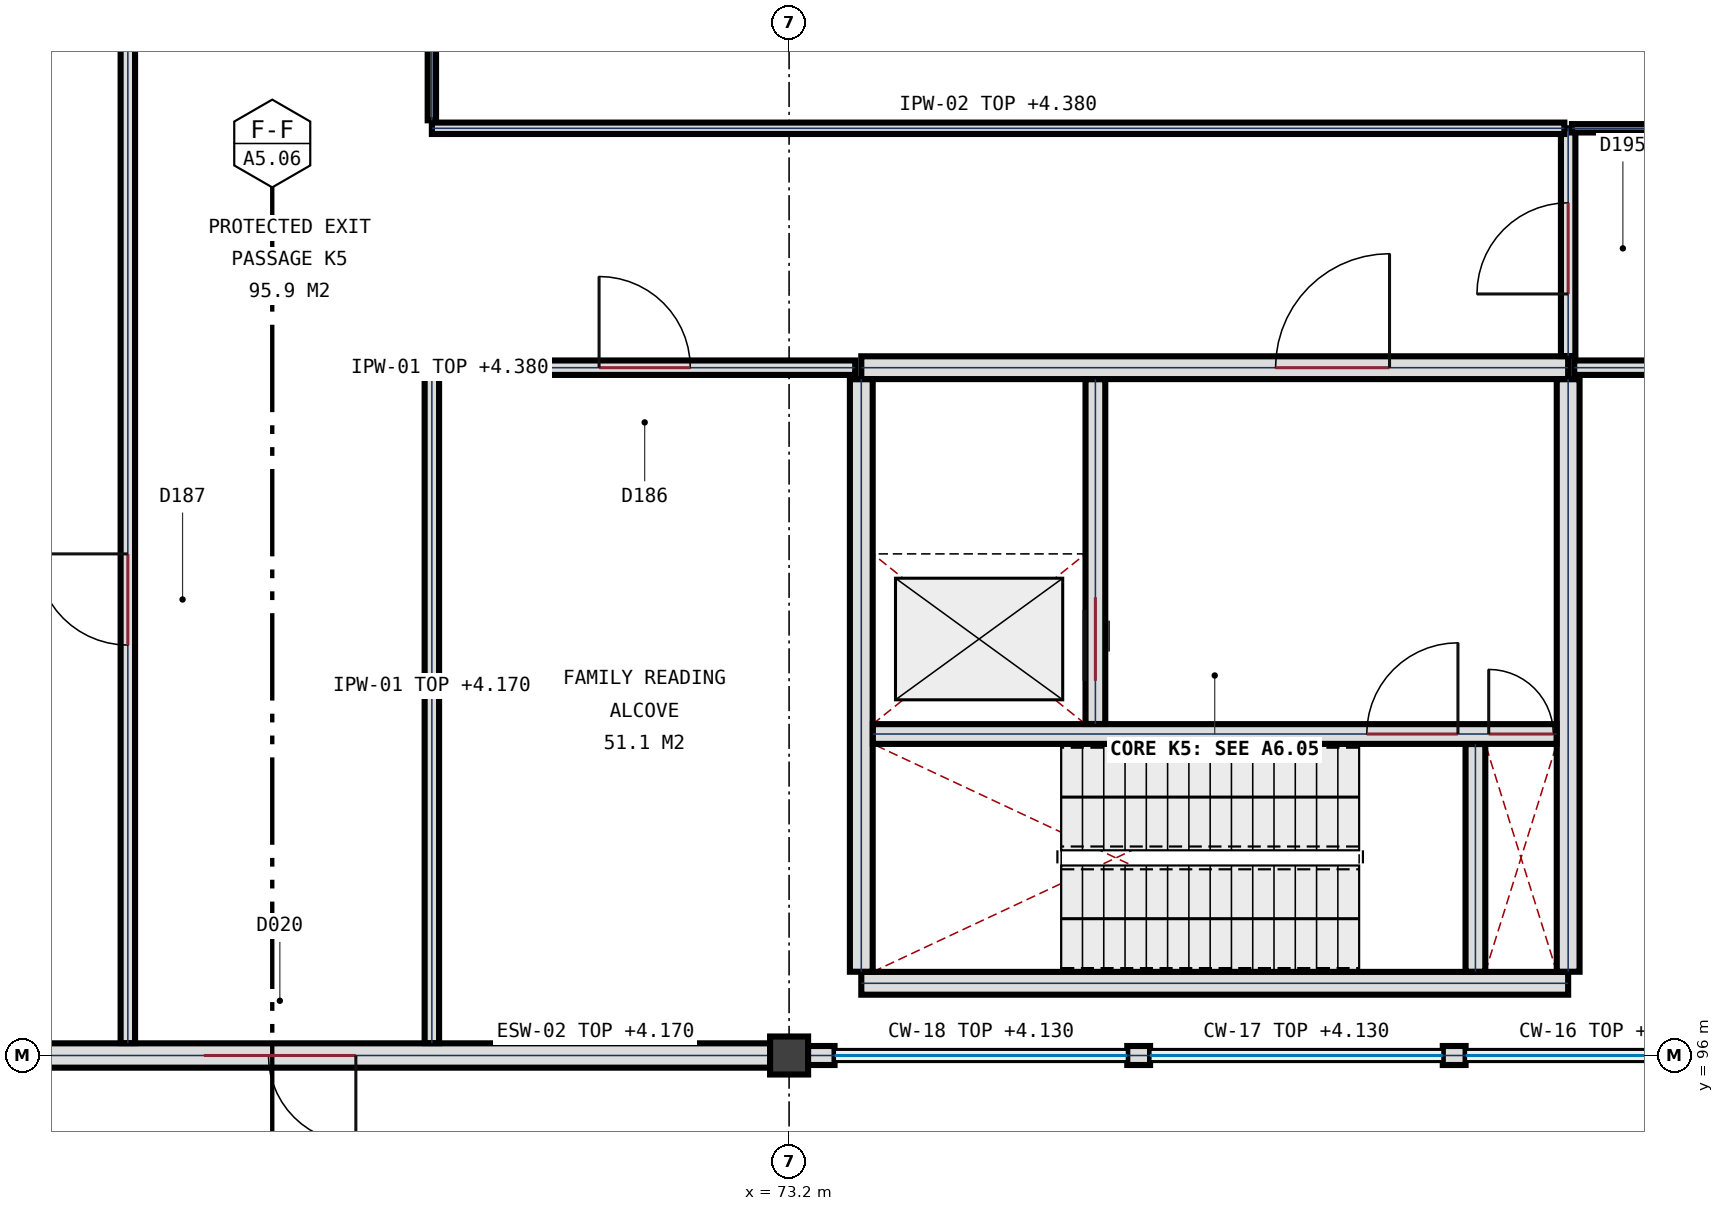
"""IFC4 building model, lengths in metres.
Left out: names, types, materials, properties, quantities, classifications, styles, units other than length and angle.
Written with IfcOpenShell. Run it as: python <this file> out.ifc"""

import sys

from ifc_helpers import new_model, si_unit, direction, frame, frame_2d, origin, origin_2d, place, context, subcontext, project, spatial, rectangle, extrude, element, fill, save


model = new_model("IFC4")
c1 = context("Model", 3, precision=1e-05, world=origin(), true_north=direction((0.0, 1.0)))
c2 = subcontext(c1, "Body", "Model", "MODEL_VIEW")
j1 = project(units=[si_unit("LENGTHUNIT", "METRE"), si_unit("PLANEANGLEUNIT", "RADIAN")], contexts=[c1])
p1 = place(None, origin())
s1 = spatial("IfcSite", under=j1, at=p1, CompositionType="ELEMENT")
p2 = place(p1, origin())
s2 = spatial("IfcBuilding", under=s1, at=p2, CompositionType="ELEMENT")
p3 = place(p2, origin())
s3 = spatial("IfcBuildingStorey", under=s2, at=p3, CompositionType="ELEMENT", Elevation=0.0)
p4 = place(p3, frame((73.2, 96.0, 0.0), z_axis=(0.0, 0.0, 1.0), x_axis=(1.0, 0.0, 0.0)))
e1 = element("IfcColumn", 1, at=p4, inside=s3, PredefinedType="COLUMN", context=c2, shape_type="SweptSolid", body=[
    extrude(rectangle(XDim=0.5, YDim=0.5, at=origin_2d()), origin(), (0.0, 0.0, 1.0), 5.4),
])
p5 = place(p3, frame((73.798, 96.0, 0.0), z_axis=(0.0, 0.0, 1.0), x_axis=(-1.0, 0.0, 0.0)))
e2 = element("IfcWall", 2, at=p5, inside=s3, PredefinedType="SOLIDWALL", context=c2, shape_type="SweptSolid", body=[
    extrude(rectangle(XDim=0.35, YDim=0.25, at=frame_2d((0.175, 0.0))), origin(), (0.0, 0.0, 1.0), 4.13),
])
for number, where, z_axis, x_axis in (
    (3, (82.101, 96.0, 0.0), (0.0, 0.0, 1.0), (-1.0, 0.0, 0.0)),
    (4, (77.949, 96.0, 0.0), (0.0, 0.0, 1.0), (-1.0, 0.0, 0.0)),
):
    element("IfcWall", number, at=place(p3, frame(where, z_axis=z_axis, x_axis=x_axis)), inside=s3, PredefinedType="SOLIDWALL", context=c2, shape_type="SweptSolid", body=[
        extrude(rectangle(XDim=0.3, YDim=0.25, at=frame_2d((0.15, 0.0))), origin(), (0.0, 0.0, 1.0), 4.13),
    ])
p6 = place(p3, frame((72.952, 96.0, 0.0), z_axis=(0.0, 0.0, 1.0), x_axis=(-1.0, 0.0, 0.0)))
e5 = element("IfcWall", 5, at=p6, inside=s3, PredefinedType="SOLIDWALL", context=c2, shape_type="SweptSolid", body=[
    extrude(rectangle(XDim=12.904, YDim=0.32, at=frame_2d((6.452, 0.0))), origin(), (0.0, 0.0, 1.0), 4.17),
])
p7 = place(p6, frame((5.452, 0.0, 0.0)))
e6 = element("IfcOpeningElement", 6, at=p7, cuts=e5, PredefinedType="OPENING", context=c2, shape_type="SweptSolid", body=[
    extrude(rectangle(XDim=2.0, YDim=2.35, at=frame_2d((1.0, 1.175))), frame((0.0, 0.17, 0.0), z_axis=(0.0, -1.0, 0.0), x_axis=(1.0, 0.0, 0.0)), (0.0, 0.0, 1.0), 0.34),
])
p8 = place(p3, frame((83.45, 96.95, 0.0), z_axis=(0.0, 0.0, 1.0), x_axis=(-1.0, 0.0, 0.0)))
e7 = element("IfcWall", 7, at=p8, inside=s3, PredefinedType="SHEAR", context=c2, shape_type="SweptSolid", body=[
    extrude(rectangle(XDim=9.3, YDim=0.3, at=frame_2d((4.65, 0.0))), origin(), (0.0, 0.0, 1.0), 5.4),
])
p9 = place(p3, frame((74.15, 105.05, 0.0), z_axis=(0.0, 0.0, 1.0), x_axis=(1.0, 0.0, 0.0)))
e8 = element("IfcWall", 8, at=p9, inside=s3, PredefinedType="SHEAR", context=c2, shape_type="SweptSolid", body=[
    extrude(rectangle(XDim=9.3, YDim=0.3, at=frame_2d((4.65, 0.0))), origin(), (0.0, 0.0, 1.0), 5.4),
])
p10 = place(p9, frame((5.45, 0.0, 0.0)))
e9 = element("IfcOpeningElement", 9, at=p10, cuts=e8, PredefinedType="OPENING", context=c2, shape_type="SweptSolid", body=[
    extrude(rectangle(XDim=1.5, YDim=2.25, at=frame_2d((0.75, 1.125))), frame((0.0, 0.16, 0.0), z_axis=(0.0, -1.0, 0.0), x_axis=(1.0, 0.0, 0.0)), (0.0, 0.0, 1.0), 0.32),
])
for number, where, z_axis, x_axis in (
    (10, (74.15, 97.102, 0.0), (0.0, 0.0, 1.0), (0.0, 1.0, 0.0)),
    (11, (83.45, 104.898, 0.0), (0.0, 0.0, 1.0), (0.0, -1.0, 0.0)),
):
    element("IfcWall", number, at=place(p3, frame(where, z_axis=z_axis, x_axis=x_axis)), inside=s3, PredefinedType="SHEAR", context=c2, shape_type="SweptSolid", body=[
        extrude(rectangle(XDim=7.796, YDim=0.3, at=frame_2d((3.898, 0.0))), origin(), (0.0, 0.0, 1.0), 5.4),
    ])
p11 = place(p3, frame((74.302, 100.23, 0.0), z_axis=(0.0, 0.0, 1.0), x_axis=(1.0, 0.0, 0.0)))
e12 = element("IfcWall", 12, at=p11, inside=s3, PredefinedType="SHEAR", context=c2, shape_type="SweptSolid", body=[
    extrude(rectangle(XDim=8.996, YDim=0.26, at=frame_2d((4.498, 0.0))), origin(), (0.0, 0.0, 1.0), 5.4),
])
p12 = place(p11, frame((6.498, 0.0, 0.0)))
e13 = element("IfcOpeningElement", 13, at=p12, cuts=e12, PredefinedType="OPENING", context=c2, shape_type="SweptSolid", body=[
    extrude(rectangle(XDim=1.2, YDim=2.2, at=frame_2d((0.6, 1.1))), frame((0.0, 0.14, 0.0), z_axis=(0.0, -1.0, 0.0), x_axis=(1.0, 0.0, 0.0)), (0.0, 0.0, 1.0), 0.28),
])
p13 = place(p11, frame((8.103, 0.0, 0.0)))
e14 = element("IfcOpeningElement", 14, at=p13, cuts=e12, PredefinedType="OPENING", context=c2, shape_type="SweptSolid", body=[
    extrude(rectangle(XDim=0.85, YDim=2.05, at=frame_2d((0.425, 1.025))), frame((0.0, 0.14, 0.0), z_axis=(0.0, -1.0, 0.0), x_axis=(1.0, 0.0, 0.0)), (0.0, 0.0, 1.0), 0.28),
])
p14 = place(p3, frame((82.23, 97.102, 0.0), z_axis=(0.0, 0.0, 1.0), x_axis=(0.0, 1.0, 0.0)))
e15 = element("IfcWall", 15, at=p14, inside=s3, PredefinedType="SHEAR", context=c2, shape_type="SweptSolid", body=[
    extrude(rectangle(XDim=2.996, YDim=0.26, at=frame_2d((1.498, 0.0))), origin(), (0.0, 0.0, 1.0), 5.4),
])
p15 = place(p3, frame((77.23, 100.362, 0.0), z_axis=(0.0, 0.0, 1.0), x_axis=(0.0, 1.0, 0.0)))
e16 = element("IfcWall", 16, at=p15, inside=s3, PredefinedType="SHEAR", context=c2, shape_type="SweptSolid", body=[
    extrude(rectangle(XDim=4.536, YDim=0.26, at=frame_2d((2.268, 0.0))), origin(), (0.0, 0.0, 1.0), 5.4),
])
p16 = place(p15, frame((0.568, 0.0, 0.0)))
e17 = element("IfcOpeningElement", 17, at=p16, cuts=e16, PredefinedType="OPENING", context=c2, shape_type="SweptSolid", body=[
    extrude(rectangle(XDim=1.1, YDim=2.15, at=frame_2d((0.55, 1.075))), frame((0.0, 0.14, 0.0), z_axis=(0.0, -1.0, 0.0), x_axis=(1.0, 0.0, 0.0)), (0.0, 0.0, 1.0), 0.28),
])
p17 = place(p3, frame((68.5, 105.05, 0.0), z_axis=(0.0, 0.0, 1.0), x_axis=(1.0, 0.0, 0.0)))
e18 = element("IfcWall", 18, at=p17, inside=s3, PredefinedType="PARTITIONING", context=c2, shape_type="SweptSolid", body=[
    extrude(rectangle(XDim=5.57, YDim=0.19, at=frame_2d((2.785, 0.0))), origin(), (0.0, 0.0, 1.0), 4.38),
])
p18 = place(p17, frame((2.2, 0.0, 0.0)))
e19 = element("IfcOpeningElement", 19, at=p18, cuts=e18, PredefinedType="OPENING", context=c2, shape_type="SweptSolid", body=[
    extrude(rectangle(XDim=1.2, YDim=2.2, at=frame_2d((0.6, 1.1))), frame((0.0, 0.105, 0.0), z_axis=(0.0, -1.0, 0.0), x_axis=(1.0, 0.0, 0.0)), (0.0, 0.0, 1.0), 0.21),
])
p19 = place(p3, frame((64.5, 96.163, 0.0), z_axis=(0.0, 0.0, 1.0), x_axis=(0.0, 1.0, 0.0)))
e20 = element("IfcWall", 20, at=p19, inside=s3, PredefinedType="PARTITIONING", context=c2, shape_type="SweptSolid", body=[
    extrude(rectangle(XDim=21.308, YDim=0.19, at=frame_2d((10.654, 0.0))), origin(), (0.0, 0.0, 1.0), 3.61),
])
p20 = place(p19, frame((5.237, 0.0, 0.0)))
e21 = element("IfcOpeningElement", 21, at=p20, cuts=e20, PredefinedType="OPENING", context=c2, shape_type="SweptSolid", body=[
    extrude(rectangle(XDim=1.2, YDim=2.2, at=frame_2d((0.6, 1.1))), frame((0.0, 0.105, 0.0), z_axis=(0.0, -1.0, 0.0), x_axis=(1.0, 0.0, 0.0)), (0.0, 0.0, 1.0), 0.21),
])
p21 = place(p3, frame((68.5, 96.163, 0.0), z_axis=(0.0, 0.0, 1.0), x_axis=(0.0, 1.0, 0.0)))
e22 = element("IfcWall", 22, at=p21, inside=s3, PredefinedType="PARTITIONING", context=c2, shape_type="SweptSolid", body=[
    extrude(rectangle(XDim=8.782, YDim=0.19, at=frame_2d((4.391, 0.0))), origin(), (0.0, 0.0, 1.0), 4.17),
])
p22 = place(p3, frame((83.45, 105.203, 0.0), z_axis=(0.0, 0.0, 1.0), x_axis=(0.0, 1.0, 0.0)))
e23 = element("IfcWall", 23, at=p22, inside=s3, PredefinedType="PARTITIONING", context=c2, shape_type="SweptSolid", body=[
    extrude(rectangle(XDim=2.997, YDim=0.19, at=frame_2d((1.499, 0.0))), origin(), (0.0, 0.0, 1.0), 5.14),
])
p23 = place(p22, frame((0.817, 0.0, 0.0)))
e24 = element("IfcOpeningElement", 24, at=p23, cuts=e23, PredefinedType="OPENING", context=c2, shape_type="SweptSolid", body=[
    extrude(rectangle(XDim=1.2, YDim=2.2, at=frame_2d((0.6, 1.1))), frame((0.0, 0.105, 0.0), z_axis=(0.0, -1.0, 0.0), x_axis=(1.0, 0.0, 0.0)), (0.0, 0.0, 1.0), 0.21),
])
p24 = place(p3, frame((68.5, 108.2, 0.0), z_axis=(0.0, 0.0, 1.0), x_axis=(1.0, 0.0, 0.0)))
e25 = element("IfcWall", 25, at=p24, inside=s3, PredefinedType="PARTITIONING", context=c2, shape_type="SweptSolid", body=[
    extrude(rectangle(XDim=14.9, YDim=0.15, at=frame_2d((7.45, 0.0))), origin(), (0.0, 0.0, 1.0), 4.38),
])
p25 = place(p3, frame((83.5, 108.2, 0.0), z_axis=(0.0, 0.0, 1.0), x_axis=(1.0, 0.0, 0.0)))
e26 = element("IfcWall", 26, at=p25, inside=s3, PredefinedType="PARTITIONING", context=c2, shape_type="SweptSolid", body=[
    extrude(rectangle(XDim=50.817, YDim=0.11, at=frame_2d((25.408, 0.0))), origin(), (0.0, 0.0, 1.0), 3.643),
])
p26 = place(p25, frame((9.075, 0.0, 0.0)))
e27 = element("IfcOpeningElement", 27, at=p26, cuts=e26, PredefinedType="OPENING", context=c2, shape_type="SweptSolid", body=[
    extrude(rectangle(XDim=1.85, YDim=2.35, at=frame_2d((0.925, 1.175))), frame((0.0, 0.065, 0.0), z_axis=(0.0, -1.0, 0.0), x_axis=(1.0, 0.0, 0.0)), (0.0, 0.0, 1.0), 0.13),
])
p27 = place(p25, frame((34.0, 0.0, 0.0)))
e28 = element("IfcOpeningElement", 28, at=p27, cuts=e26, PredefinedType="OPENING", context=c2, shape_type="SweptSolid", body=[
    extrude(rectangle(XDim=1.0, YDim=2.2, at=frame_2d((0.5, 1.1))), frame((0.0, 0.065, 0.0), z_axis=(0.0, -1.0, 0.0), x_axis=(1.0, 0.0, 0.0)), (0.0, 0.0, 1.0), 0.13),
])
p28 = place(p3, frame((83.53, 105.05, 0.0), z_axis=(0.0, 0.0, 1.0), x_axis=(1.0, 0.0, 0.0)))
e29 = element("IfcWall", 29, at=p28, inside=s3, PredefinedType="PARTITIONING", context=c2, shape_type="SweptSolid", body=[
    extrude(rectangle(XDim=42.17, YDim=0.19, at=frame_2d((21.085, 0.0))), origin(), (0.0, 0.0, 1.0), 4.13),
])
p29 = place(p28, frame((22.97, 0.0, 0.0)))
e30 = element("IfcOpeningElement", 30, at=p29, cuts=e29, PredefinedType="OPENING", context=c2, shape_type="SweptSolid", body=[
    extrude(rectangle(XDim=1.0, YDim=2.2, at=frame_2d((0.5, 1.1))), frame((0.0, 0.105, 0.0), z_axis=(0.0, -1.0, 0.0), x_axis=(1.0, 0.0, 0.0)), (0.0, 0.0, 1.0), 0.21),
])
p30 = place(p3, frame((68.5, 108.305, 0.0), z_axis=(0.0, 0.0, 1.0), x_axis=(0.0, 1.0, 0.0)))
e31 = element("IfcWall", 31, at=p30, inside=s3, PredefinedType="PARTITIONING", context=c2, shape_type="SweptSolid", body=[
    extrude(rectangle(XDim=9.166, YDim=0.11, at=frame_2d((4.583, 0.0))), origin(), (0.0, 0.0, 1.0), 3.61),
])
p31 = place(p7, origin())
e32 = element("IfcDoor", 32, at=p31, inside=s3, OperationType="SINGLE_SWING_LEFT", PredefinedType="DOOR", context=c2, shape_type="SweptSolid", body=[
    extrude(rectangle(XDim=2.0, YDim=2.35, at=frame_2d((1.0, 1.175))), frame((0.0, 0.032, 0.0), z_axis=(0.0, -1.0, 0.0), x_axis=(1.0, 0.0, 0.0)), (0.0, 0.0, 1.0), 0.065),
])
fill(e6, e32)
p32 = place(p10, origin())
e33 = element("IfcDoor", 33, at=p32, inside=s3, OperationType="SINGLE_SWING_RIGHT", PredefinedType="DOOR", context=c2, shape_type="SweptSolid", body=[
    extrude(rectangle(XDim=1.5, YDim=2.25, at=frame_2d((0.75, 1.125))), frame((0.0, 0.032, 0.0), z_axis=(0.0, -1.0, 0.0), x_axis=(1.0, 0.0, 0.0)), (0.0, 0.0, 1.0), 0.065),
])
fill(e9, e33)
p33 = place(p12, origin())
e34 = element("IfcDoor", 34, at=p33, inside=s3, OperationType="SINGLE_SWING_RIGHT", PredefinedType="DOOR", context=c2, shape_type="SweptSolid", body=[
    extrude(rectangle(XDim=1.2, YDim=2.2, at=frame_2d((0.6, 1.1))), frame((0.0, 0.032, 0.0), z_axis=(0.0, -1.0, 0.0), x_axis=(1.0, 0.0, 0.0)), (0.0, 0.0, 1.0), 0.065),
])
fill(e13, e34)
p34 = place(p13, origin())
e35 = element("IfcDoor", 35, at=p34, inside=s3, OperationType="SINGLE_SWING_LEFT", PredefinedType="DOOR", context=c2, shape_type="SweptSolid", body=[
    extrude(rectangle(XDim=0.85, YDim=2.05, at=frame_2d((0.425, 1.025))), frame((0.0, 0.032, 0.0), z_axis=(0.0, -1.0, 0.0), x_axis=(1.0, 0.0, 0.0)), (0.0, 0.0, 1.0), 0.065),
])
fill(e14, e35)
p35 = place(p16, origin())
e36 = element("IfcDoor", 36, at=p35, inside=s3, OperationType="SLIDING_TO_LEFT", PredefinedType="DOOR", context=c2, shape_type="SweptSolid", body=[
    extrude(rectangle(XDim=1.1, YDim=2.15, at=frame_2d((0.55, 1.075))), frame((0.0, 0.032, 0.0), z_axis=(0.0, -1.0, 0.0), x_axis=(1.0, 0.0, 0.0)), (0.0, 0.0, 1.0), 0.065),
])
fill(e17, e36)
p36 = place(p18, origin())
e37 = element("IfcDoor", 37, at=p36, inside=s3, OperationType="SINGLE_SWING_LEFT", PredefinedType="DOOR", context=c2, shape_type="SweptSolid", body=[
    extrude(rectangle(XDim=1.2, YDim=2.2, at=frame_2d((0.6, 1.1))), frame((0.0, 0.032, 0.0), z_axis=(0.0, -1.0, 0.0), x_axis=(1.0, 0.0, 0.0)), (0.0, 0.0, 1.0), 0.065),
])
fill(e19, e37)
p37 = place(p20, origin())
e38 = element("IfcDoor", 38, at=p37, inside=s3, OperationType="SINGLE_SWING_RIGHT", PredefinedType="DOOR", context=c2, shape_type="SweptSolid", body=[
    extrude(rectangle(XDim=1.2, YDim=2.2, at=frame_2d((0.6, 1.1))), frame((0.0, 0.032, 0.0), z_axis=(0.0, -1.0, 0.0), x_axis=(1.0, 0.0, 0.0)), (0.0, 0.0, 1.0), 0.065),
])
fill(e21, e38)
p38 = place(p23, origin())
e39 = element("IfcDoor", 39, at=p38, inside=s3, OperationType="SINGLE_SWING_LEFT", PredefinedType="DOOR", context=c2, shape_type="SweptSolid", body=[
    extrude(rectangle(XDim=1.2, YDim=2.2, at=frame_2d((0.6, 1.1))), frame((0.0, 0.032, 0.0), z_axis=(0.0, -1.0, 0.0), x_axis=(1.0, 0.0, 0.0)), (0.0, 0.0, 1.0), 0.065),
])
fill(e24, e39)
save(model, sys.argv[1])
